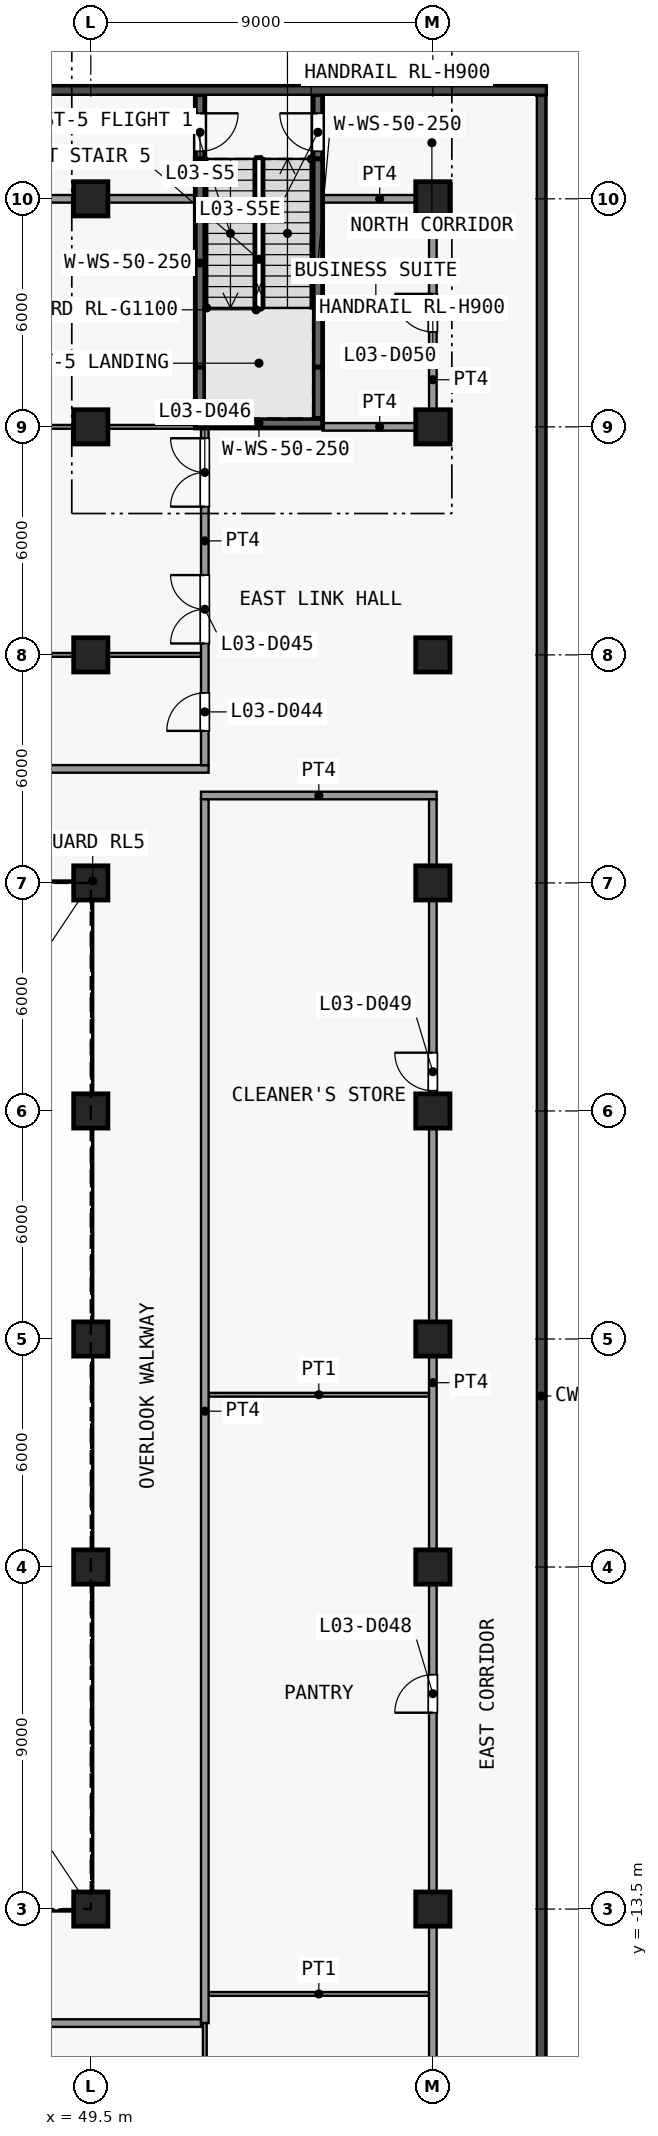
"""IFC4 building model, lengths in metres.
Left out: names, types, materials, properties, quantities, classifications, styles, units other than length and angle.
Written with IfcOpenShell. Run it as: python <this file> out.ifc"""

import sys

from ifc_helpers import new_model, si_unit, direction, frame, frame_2d, origin, origin_2d, place, context, subcontext, project, spatial, rectangle, extrude, element, fill, save


model = new_model("IFC4")
c1 = context("Model", 3, precision=1e-05, world=origin(), true_north=direction((0.0, 1.0)))
c2 = subcontext(c1, "Body", "Model", "MODEL_VIEW")
j1 = project(units=[si_unit("LENGTHUNIT", "METRE"), si_unit("PLANEANGLEUNIT", "RADIAN")], contexts=[c1])
p1 = place(None, origin())
s1 = spatial("IfcSite", under=j1, at=p1, CompositionType="ELEMENT")
p2 = place(p1, origin())
s2 = spatial("IfcBuilding", under=s1, at=p2, CompositionType="ELEMENT")
p3 = place(p2, frame((0.0, 0.0, 18.5)))
s3 = spatial("IfcBuildingStorey", under=s2, at=p3, CompositionType="ELEMENT", Elevation=18.5)
for number, where, z_axis, x_axis in (
    (1, (49.5, -13.5, 0.0), (0.0, 0.0, 1.0), (1.0, 0.0, 0.0)),
    (2, (49.5, -4.5, 0.0), (0.0, 0.0, 1.0), (1.0, 0.0, 0.0)),
    (3, (49.5, 1.5, 0.0), (0.0, 0.0, 1.0), (1.0, 0.0, 0.0)),
    (4, (49.5, 7.5, 0.0), (0.0, 0.0, 1.0), (1.0, 0.0, 0.0)),
    (5, (49.5, 13.5, 0.0), (0.0, 0.0, 1.0), (1.0, 0.0, 0.0)),
    (6, (49.5, 19.5, 0.0), (0.0, 0.0, 1.0), (1.0, 0.0, 0.0)),
    (7, (49.5, 25.5, 0.0), (0.0, 0.0, 1.0), (1.0, 0.0, 0.0)),
    (8, (49.5, 31.5, 0.0), (0.0, 0.0, 1.0), (1.0, 0.0, 0.0)),
    (9, (58.5, -13.5, 0.0), (0.0, 0.0, 1.0), (1.0, 0.0, 0.0)),
    (10, (58.5, -4.5, 0.0), (0.0, 0.0, 1.0), (1.0, 0.0, 0.0)),
    (11, (58.5, 1.5, 0.0), (0.0, 0.0, 1.0), (1.0, 0.0, 0.0)),
    (12, (58.5, 7.5, 0.0), (0.0, 0.0, 1.0), (1.0, 0.0, 0.0)),
    (13, (58.5, 13.5, 0.0), (0.0, 0.0, 1.0), (1.0, 0.0, 0.0)),
    (14, (58.5, 19.5, 0.0), (0.0, 0.0, 1.0), (1.0, 0.0, 0.0)),
    (15, (58.5, 25.5, 0.0), (0.0, 0.0, 1.0), (1.0, 0.0, 0.0)),
    (16, (58.5, 31.5, 0.0), (0.0, 0.0, 1.0), (1.0, 0.0, 0.0)),
):
    element("IfcColumn", number, at=place(p3, frame(where, z_axis=z_axis, x_axis=x_axis)), inside=s3, PredefinedType="COLUMN", context=c2, shape_type="SweptSolid", body=[
        extrude(rectangle(XDim=0.9, YDim=0.9, at=origin_2d()), origin(), (0.0, 0.0, 1.0), 5.0),
    ])
p4 = place(p3, frame((52.375, 34.24, 0.0), z_axis=(0.0, 0.0, 1.0), x_axis=(0.0, -1.0, 0.0)))
e17 = element("IfcWall", 17, at=p4, inside=s3, PredefinedType="SHEAR", context=c2, shape_type="SweptSolid", body=[
    extrude(rectangle(XDim=1.69, YDim=0.25, at=frame_2d((0.845, 0.0))), origin(), (0.0, 0.0, 1.0), 4.65),
])
p5 = place(p4, frame((0.49, 0.0, 0.0)))
e18 = element("IfcOpeningElement", 18, at=p5, cuts=e17, PredefinedType="OPENING", context=c2, shape_type="SweptSolid", body=[
    extrude(rectangle(XDim=1.0, YDim=2.1, at=frame_2d((0.5, 1.05))), frame((0.0, 0.135, 0.0), z_axis=(0.0, -1.0, 0.0), x_axis=(1.0, 0.0, 0.0)), (0.0, 0.0, 1.0), 0.27),
])
p6 = place(p3, frame((52.375, 27.07, 0.0), z_axis=(0.0, 0.0, 1.0), x_axis=(0.0, 1.0, 0.0)))
e19 = element("IfcWall", 19, at=p6, inside=s3, PredefinedType="SHEAR", context=c2, shape_type="SweptSolid", body=[
    extrude(rectangle(XDim=5.48, YDim=0.25, at=frame_2d((2.74, 0.0))), origin(), (0.0, 0.0, 1.0), 4.65),
])
p7 = place(p3, frame((52.375, 25.72, 0.0), z_axis=(0.0, 0.0, 1.0), x_axis=(0.0, 1.0, 0.0)))
e20 = element("IfcWall", 20, at=p7, inside=s3, PredefinedType="SHEAR", context=c2, shape_type="SweptSolid", body=[
    extrude(rectangle(XDim=1.35, YDim=0.25, at=frame_2d((0.675, 0.0))), origin(), (0.0, 0.0, 1.0), 4.65),
])
p8 = place(p3, frame((55.475, 32.55, 0.0), z_axis=(0.0, 0.0, 1.0), x_axis=(0.0, 1.0, 0.0)))
e21 = element("IfcWall", 21, at=p8, inside=s3, PredefinedType="SHEAR", context=c2, shape_type="SweptSolid", body=[
    extrude(rectangle(XDim=1.69, YDim=0.25, at=frame_2d((0.845, 0.0))), origin(), (0.0, 0.0, 1.0), 4.65),
])
p9 = place(p8, frame((0.2, 0.0, 0.0)))
e22 = element("IfcOpeningElement", 22, at=p9, cuts=e21, PredefinedType="OPENING", context=c2, shape_type="SweptSolid", body=[
    extrude(rectangle(XDim=1.0, YDim=2.1, at=frame_2d((0.5, 1.05))), frame((0.0, 0.135, 0.0), z_axis=(0.0, -1.0, 0.0), x_axis=(1.0, 0.0, 0.0)), (0.0, 0.0, 1.0), 0.27),
])
p10 = place(p3, frame((55.475, 27.07, 0.0), z_axis=(0.0, 0.0, 1.0), x_axis=(0.0, 1.0, 0.0)))
e23 = element("IfcWall", 23, at=p10, inside=s3, PredefinedType="SHEAR", context=c2, shape_type="SweptSolid", body=[
    extrude(rectangle(XDim=5.48, YDim=0.25, at=frame_2d((2.74, 0.0))), origin(), (0.0, 0.0, 1.0), 4.65),
])
p11 = place(p3, frame((55.475, 25.72, 0.0), z_axis=(0.0, 0.0, 1.0), x_axis=(0.0, 1.0, 0.0)))
e24 = element("IfcWall", 24, at=p11, inside=s3, PredefinedType="SHEAR", context=c2, shape_type="SweptSolid", body=[
    extrude(rectangle(XDim=1.35, YDim=0.25, at=frame_2d((0.675, 0.0))), origin(), (0.0, 0.0, 1.0), 4.65),
])
p12 = place(p3, frame((52.25, 25.595, 0.0), z_axis=(0.0, 0.0, 1.0), x_axis=(1.0, 0.0, 0.0)))
e25 = element("IfcWall", 25, at=p12, inside=s3, PredefinedType="SHEAR", context=c2, shape_type="SweptSolid", body=[
    extrude(rectangle(XDim=3.35, YDim=0.25, at=frame_2d((1.675, 0.0))), origin(), (0.0, 0.0, 1.0), 4.65),
])
p13 = place(p3, frame((31.4, -16.5, 0.0), z_axis=(0.0, 0.0, 1.0), x_axis=(1.0, 0.0, 0.0)))
e26 = element("IfcWall", 26, at=p13, inside=s3, PredefinedType="PARTITIONING", context=c2, shape_type="SweptSolid", body=[
    extrude(rectangle(XDim=21.0, YDim=0.2, at=frame_2d((10.5, 0.0))), origin(), (0.0, 0.0, 1.0), 4.65),
])
p14 = place(p13, frame((3.2, 0.0, 0.0)))
e27 = element("IfcOpeningElement", 27, at=p14, cuts=e26, PredefinedType="OPENING", context=c2, shape_type="SweptSolid", body=[
    extrude(rectangle(XDim=1.0, YDim=2.1, at=frame_2d((0.5, 1.05))), frame((0.0, 0.11, 0.0), z_axis=(0.0, -1.0, 0.0), x_axis=(1.0, 0.0, 0.0)), (0.0, 0.0, 1.0), 0.22),
])
p15 = place(p13, frame((14.0, 0.0, 0.0)))
e28 = element("IfcOpeningElement", 28, at=p15, cuts=e26, PredefinedType="OPENING", context=c2, shape_type="SweptSolid", body=[
    extrude(rectangle(XDim=1.0, YDim=2.1, at=frame_2d((0.5, 1.05))), frame((0.0, 0.11, 0.0), z_axis=(0.0, -1.0, 0.0), x_axis=(1.0, 0.0, 0.0)), (0.0, 0.0, 1.0), 0.22),
])
for number, where, z_axis, x_axis in (
    (29, (52.6, -15.733, 0.0), (0.0, 0.0, 1.0), (1.0, 0.0, 0.0)),
    (30, (52.6, 0.033, 0.0), (0.0, 0.0, 1.0), (1.0, 0.0, 0.0)),
):
    element("IfcWall", number, at=place(p3, frame(where, z_axis=z_axis, x_axis=x_axis)), inside=s3, PredefinedType="PARTITIONING", context=c2, shape_type="SweptSolid", body=[
        extrude(rectangle(XDim=5.8, YDim=0.1, at=frame_2d((2.9, 0.0))), origin(), (0.0, 0.0, 1.0), 4.65),
    ])
p16 = place(p3, frame((52.4, 15.8, 0.0), z_axis=(0.0, 0.0, 1.0), x_axis=(1.0, 0.0, 0.0)))
e31 = element("IfcWall", 31, at=p16, inside=s3, PredefinedType="PARTITIONING", context=c2, shape_type="SweptSolid", body=[
    extrude(rectangle(XDim=6.2, YDim=0.2, at=frame_2d((3.1, 0.0))), origin(), (0.0, 0.0, 1.0), 4.65),
])
p17 = place(p3, frame((28.4, 16.5, 0.0), z_axis=(0.0, 0.0, 1.0), x_axis=(1.0, 0.0, 0.0)))
e32 = element("IfcWall", 32, at=p17, inside=s3, PredefinedType="PARTITIONING", context=c2, shape_type="SweptSolid", body=[
    extrude(rectangle(XDim=24.2, YDim=0.2, at=frame_2d((12.1, 0.0))), origin(), (0.0, 0.0, 1.0), 4.65),
])
p18 = place(p17, frame((6.2, 0.0, 0.0)))
e33 = element("IfcOpeningElement", 33, at=p18, cuts=e32, PredefinedType="OPENING", context=c2, shape_type="SweptSolid", body=[
    extrude(rectangle(XDim=1.0, YDim=2.1, at=frame_2d((0.5, 1.05))), frame((0.0, 0.11, 0.0), z_axis=(0.0, -1.0, 0.0), x_axis=(1.0, 0.0, 0.0)), (0.0, 0.0, 1.0), 0.22),
])
p19 = place(p17, frame((17.0, 0.0, 0.0)))
e34 = element("IfcOpeningElement", 34, at=p19, cuts=e32, PredefinedType="OPENING", context=c2, shape_type="SweptSolid", body=[
    extrude(rectangle(XDim=1.0, YDim=2.1, at=frame_2d((0.5, 1.05))), frame((0.0, 0.11, 0.0), z_axis=(0.0, -1.0, 0.0), x_axis=(1.0, 0.0, 0.0)), (0.0, 0.0, 1.0), 0.22),
])
p20 = place(p3, frame((28.5, 19.5, 0.0), z_axis=(0.0, 0.0, 1.0), x_axis=(1.0, 0.0, 0.0)))
e35 = element("IfcWall", 35, at=p20, inside=s3, PredefinedType="PARTITIONING", context=c2, shape_type="SweptSolid", body=[
    extrude(rectangle(XDim=23.9, YDim=0.1, at=frame_2d((11.95, 0.0))), origin(), (0.0, 0.0, 1.0), 4.65),
])
p21 = place(p3, frame((55.6, 25.5, 0.0), z_axis=(0.0, 0.0, 1.0), x_axis=(1.0, 0.0, 0.0)))
e36 = element("IfcWall", 36, at=p21, inside=s3, PredefinedType="PARTITIONING", context=c2, shape_type="SweptSolid", body=[
    extrude(rectangle(XDim=3.0, YDim=0.2, at=frame_2d((1.5, 0.0))), origin(), (0.0, 0.0, 1.0), 4.65),
])
p22 = place(p3, frame((-25.9, 25.5, 0.0), z_axis=(0.0, 0.0, 1.0), x_axis=(1.0, 0.0, 0.0)))
e37 = element("IfcWall", 37, at=p22, inside=s3, PredefinedType="PARTITIONING", context=c2, shape_type="SweptSolid", body=[
    extrude(rectangle(XDim=78.15, YDim=0.1, at=frame_2d((39.075, 0.0))), origin(), (0.0, 0.0, 1.0), 4.65),
])
p23 = place(p3, frame((-25.9, 31.5, 0.0), z_axis=(0.0, 0.0, 1.0), x_axis=(1.0, 0.0, 0.0)))
e38 = element("IfcWall", 38, at=p23, inside=s3, PredefinedType="PARTITIONING", context=c2, shape_type="SweptSolid", body=[
    extrude(rectangle(XDim=78.15, YDim=0.2, at=frame_2d((39.075, 0.0))), origin(), (0.0, 0.0, 1.0), 4.65),
])
p24 = place(p23, frame((1.8, 0.0, 0.0)))
e39 = element("IfcOpeningElement", 39, at=p24, cuts=e38, PredefinedType="OPENING", context=c2, shape_type="SweptSolid", body=[
    extrude(rectangle(XDim=1.0, YDim=2.1, at=frame_2d((0.5, 1.05))), frame((0.0, 0.11, 0.0), z_axis=(0.0, -1.0, 0.0), x_axis=(1.0, 0.0, 0.0)), (0.0, 0.0, 1.0), 0.22),
])
p25 = place(p23, frame((7.8, 0.0, 0.0)))
e40 = element("IfcOpeningElement", 40, at=p25, cuts=e38, PredefinedType="OPENING", context=c2, shape_type="SweptSolid", body=[
    extrude(rectangle(XDim=1.0, YDim=2.1, at=frame_2d((0.5, 1.05))), frame((0.0, 0.11, 0.0), z_axis=(0.0, -1.0, 0.0), x_axis=(1.0, 0.0, 0.0)), (0.0, 0.0, 1.0), 0.22),
])
p26 = place(p23, frame((18.4, 0.0, 0.0)))
e41 = element("IfcOpeningElement", 41, at=p26, cuts=e38, PredefinedType="OPENING", context=c2, shape_type="SweptSolid", body=[
    extrude(rectangle(XDim=1.0, YDim=2.1, at=frame_2d((0.5, 1.05))), frame((0.0, 0.11, 0.0), z_axis=(0.0, -1.0, 0.0), x_axis=(1.0, 0.0, 0.0)), (0.0, 0.0, 1.0), 0.22),
])
p27 = place(p23, frame((34.8, 0.0, 0.0)))
e42 = element("IfcOpeningElement", 42, at=p27, cuts=e38, PredefinedType="OPENING", context=c2, shape_type="SweptSolid", body=[
    extrude(rectangle(XDim=1.0, YDim=2.1, at=frame_2d((0.5, 1.05))), frame((0.0, 0.11, 0.0), z_axis=(0.0, -1.0, 0.0), x_axis=(1.0, 0.0, 0.0)), (0.0, 0.0, 1.0), 0.22),
])
p28 = place(p23, frame((49.6, 0.0, 0.0)))
e43 = element("IfcOpeningElement", 43, at=p28, cuts=e38, PredefinedType="OPENING", context=c2, shape_type="SweptSolid", body=[
    extrude(rectangle(XDim=1.0, YDim=2.1, at=frame_2d((0.5, 1.05))), frame((0.0, 0.11, 0.0), z_axis=(0.0, -1.0, 0.0), x_axis=(1.0, 0.0, 0.0)), (0.0, 0.0, 1.0), 0.22),
])
p29 = place(p23, frame((59.9, 0.0, 0.0)))
e44 = element("IfcOpeningElement", 44, at=p29, cuts=e38, PredefinedType="OPENING", context=c2, shape_type="SweptSolid", body=[
    extrude(rectangle(XDim=1.0, YDim=2.1, at=frame_2d((0.5, 1.05))), frame((0.0, 0.11, 0.0), z_axis=(0.0, -1.0, 0.0), x_axis=(1.0, 0.0, 0.0)), (0.0, 0.0, 1.0), 0.22),
])
p30 = place(p23, frame((73.2, 0.0, 0.0)))
e45 = element("IfcOpeningElement", 45, at=p30, cuts=e38, PredefinedType="OPENING", context=c2, shape_type="SweptSolid", body=[
    extrude(rectangle(XDim=1.0, YDim=2.1, at=frame_2d((0.5, 1.05))), frame((0.0, 0.11, 0.0), z_axis=(0.0, -1.0, 0.0), x_axis=(1.0, 0.0, 0.0)), (0.0, 0.0, 1.0), 0.22),
])
p31 = place(p3, frame((55.6, 31.5, 0.0), z_axis=(0.0, 0.0, 1.0), x_axis=(1.0, 0.0, 0.0)))
e46 = element("IfcWall", 46, at=p31, inside=s3, PredefinedType="PARTITIONING", context=c2, shape_type="SweptSolid", body=[
    extrude(rectangle(XDim=3.0, YDim=0.2, at=frame_2d((1.5, 0.0))), origin(), (0.0, 0.0, 1.0), 4.65),
])
p32 = place(p3, frame((52.5, -16.5, 0.0), z_axis=(0.0, 0.0, 1.0), x_axis=(0.0, 1.0, 0.0)))
e47 = element("IfcWall", 47, at=p32, inside=s3, PredefinedType="PARTITIONING", context=c2, shape_type="SweptSolid", body=[
    extrude(rectangle(XDim=32.2, YDim=0.2, at=frame_2d((16.1, 0.0))), origin(), (0.0, 0.0, 1.0), 4.65),
])
p33 = place(p3, frame((52.5, 16.6, 0.0), z_axis=(0.0, 0.0, 1.0), x_axis=(0.0, 1.0, 0.0)))
e48 = element("IfcWall", 48, at=p33, inside=s3, PredefinedType="PARTITIONING", context=c2, shape_type="SweptSolid", body=[
    extrude(rectangle(XDim=8.87, YDim=0.2, at=frame_2d((4.435, 0.0))), origin(), (0.0, 0.0, 1.0), 4.65),
])
p34 = place(p33, frame((0.9, 0.0, 0.0)))
e49 = element("IfcOpeningElement", 49, at=p34, cuts=e48, PredefinedType="OPENING", context=c2, shape_type="SweptSolid", body=[
    extrude(rectangle(XDim=1.0, YDim=2.1, at=frame_2d((0.5, 1.05))), frame((0.0, 0.11, 0.0), z_axis=(0.0, -1.0, 0.0), x_axis=(1.0, 0.0, 0.0)), (0.0, 0.0, 1.0), 0.22),
])
p35 = place(p33, frame((3.2, 0.0, 0.0)))
e50 = element("IfcOpeningElement", 50, at=p35, cuts=e48, PredefinedType="OPENING", context=c2, shape_type="SweptSolid", body=[
    extrude(rectangle(XDim=1.8, YDim=2.1, at=frame_2d((0.9, 1.05))), frame((0.0, 0.11, 0.0), z_axis=(0.0, -1.0, 0.0), x_axis=(1.0, 0.0, 0.0)), (0.0, 0.0, 1.0), 0.22),
])
p36 = place(p33, frame((6.8, 0.0, 0.0)))
e51 = element("IfcOpeningElement", 51, at=p36, cuts=e48, PredefinedType="OPENING", context=c2, shape_type="SweptSolid", body=[
    extrude(rectangle(XDim=1.8, YDim=2.1, at=frame_2d((0.9, 1.05))), frame((0.0, 0.11, 0.0), z_axis=(0.0, -1.0, 0.0), x_axis=(1.0, 0.0, 0.0)), (0.0, 0.0, 1.0), 0.22),
])
p37 = place(p3, frame((52.5, -25.47, 0.0), z_axis=(0.0, 0.0, 1.0), x_axis=(0.0, 1.0, 0.0)))
e52 = element("IfcWall", 52, at=p37, inside=s3, PredefinedType="PARTITIONING", context=c2, shape_type="SweptSolid", body=[
    extrude(rectangle(XDim=8.97, YDim=0.1, at=frame_2d((4.485, 0.0))), origin(), (0.0, 0.0, 1.0), 4.65),
])
p38 = place(p3, frame((58.5, -31.4, 0.0), z_axis=(0.0, 0.0, 1.0), x_axis=(0.0, 1.0, 0.0)))
e53 = element("IfcWall", 53, at=p38, inside=s3, PredefinedType="PARTITIONING", context=c2, shape_type="SweptSolid", body=[
    extrude(rectangle(XDim=47.1, YDim=0.2, at=frame_2d((23.55, 0.0))), origin(), (0.0, 0.0, 1.0), 4.65),
])
p39 = place(p38, frame((7.3, 0.0, 0.0)))
e54 = element("IfcOpeningElement", 54, at=p39, cuts=e53, PredefinedType="OPENING", context=c2, shape_type="SweptSolid", body=[
    extrude(rectangle(XDim=1.0, YDim=2.1, at=frame_2d((0.5, 1.05))), frame((0.0, 0.11, 0.0), z_axis=(0.0, -1.0, 0.0), x_axis=(1.0, 0.0, 0.0)), (0.0, 0.0, 1.0), 0.22),
])
p40 = place(p38, frame((23.067, 0.0, 0.0)))
e55 = element("IfcOpeningElement", 55, at=p40, cuts=e53, PredefinedType="OPENING", context=c2, shape_type="SweptSolid", body=[
    extrude(rectangle(XDim=1.0, YDim=2.1, at=frame_2d((0.5, 1.05))), frame((0.0, 0.11, 0.0), z_axis=(0.0, -1.0, 0.0), x_axis=(1.0, 0.0, 0.0)), (0.0, 0.0, 1.0), 0.22),
])
p41 = place(p38, frame((39.433, 0.0, 0.0)))
e56 = element("IfcOpeningElement", 56, at=p41, cuts=e53, PredefinedType="OPENING", context=c2, shape_type="SweptSolid", body=[
    extrude(rectangle(XDim=1.0, YDim=2.1, at=frame_2d((0.5, 1.05))), frame((0.0, 0.11, 0.0), z_axis=(0.0, -1.0, 0.0), x_axis=(1.0, 0.0, 0.0)), (0.0, 0.0, 1.0), 0.22),
])
p42 = place(p3, frame((58.5, 25.6, 0.0), z_axis=(0.0, 0.0, 1.0), x_axis=(0.0, 1.0, 0.0)))
e57 = element("IfcWall", 57, at=p42, inside=s3, PredefinedType="PARTITIONING", context=c2, shape_type="SweptSolid", body=[
    extrude(rectangle(XDim=5.8, YDim=0.2, at=frame_2d((2.9, 0.0))), origin(), (0.0, 0.0, 1.0), 4.65),
])
p43 = place(p42, frame((2.4, 0.0, 0.0)))
e58 = element("IfcOpeningElement", 58, at=p43, cuts=e57, PredefinedType="OPENING", context=c2, shape_type="SweptSolid", body=[
    extrude(rectangle(XDim=1.0, YDim=2.1, at=frame_2d((0.5, 1.05))), frame((0.0, 0.11, 0.0), z_axis=(0.0, -1.0, 0.0), x_axis=(1.0, 0.0, 0.0)), (0.0, 0.0, 1.0), 0.22),
])
p44 = place(p5, origin())
e59 = element("IfcDoor", 59, at=p44, inside=s3, OperationType="SINGLE_SWING_LEFT", PredefinedType="DOOR", context=c2, shape_type="SweptSolid", body=[
    extrude(rectangle(XDim=1.0, YDim=2.1, at=frame_2d((0.5, 1.05))), frame((0.0, 0.025, 0.0), z_axis=(0.0, -1.0, 0.0), x_axis=(1.0, 0.0, 0.0)), (0.0, 0.0, 1.0), 0.05),
])
fill(e18, e59)
p45 = place(p9, origin())
e60 = element("IfcDoor", 60, at=p45, inside=s3, OperationType="SINGLE_SWING_RIGHT", PredefinedType="DOOR", context=c2, shape_type="SweptSolid", body=[
    extrude(rectangle(XDim=1.0, YDim=2.1, at=frame_2d((0.5, 1.05))), frame((0.0, 0.025, 0.0), z_axis=(0.0, -1.0, 0.0), x_axis=(1.0, 0.0, 0.0)), (0.0, 0.0, 1.0), 0.05),
])
fill(e22, e60)
p46 = place(p34, origin())
e61 = element("IfcDoor", 61, at=p46, inside=s3, OperationType="SINGLE_SWING_RIGHT", PredefinedType="DOOR", context=c2, shape_type="SweptSolid", body=[
    extrude(rectangle(XDim=1.0, YDim=2.1, at=frame_2d((0.5, 1.05))), frame((0.0, 0.025, 0.0), z_axis=(0.0, -1.0, 0.0), x_axis=(1.0, 0.0, 0.0)), (0.0, 0.0, 1.0), 0.05),
])
fill(e49, e61)
p47 = place(p35, origin())
e62 = element("IfcDoor", 62, at=p47, inside=s3, OperationType="DOUBLE_DOOR_SINGLE_SWING", PredefinedType="DOOR", context=c2, shape_type="SweptSolid", body=[
    extrude(rectangle(XDim=1.8, YDim=2.1, at=frame_2d((0.9, 1.05))), frame((0.0, 0.025, 0.0), z_axis=(0.0, -1.0, 0.0), x_axis=(1.0, 0.0, 0.0)), (0.0, 0.0, 1.0), 0.05),
])
fill(e50, e62)
p48 = place(p36, origin())
e63 = element("IfcDoor", 63, at=p48, inside=s3, OperationType="DOUBLE_DOOR_SINGLE_SWING", PredefinedType="DOOR", context=c2, shape_type="SweptSolid", body=[
    extrude(rectangle(XDim=1.8, YDim=2.1, at=frame_2d((0.9, 1.05))), frame((0.0, 0.025, 0.0), z_axis=(0.0, -1.0, 0.0), x_axis=(1.0, 0.0, 0.0)), (0.0, 0.0, 1.0), 0.05),
])
fill(e51, e63)
p49 = place(p40, origin())
e64 = element("IfcDoor", 64, at=p49, inside=s3, OperationType="SINGLE_SWING_RIGHT", PredefinedType="DOOR", context=c2, shape_type="SweptSolid", body=[
    extrude(rectangle(XDim=1.0, YDim=2.1, at=frame_2d((0.5, 1.05))), frame((0.0, 0.025, 0.0), z_axis=(0.0, -1.0, 0.0), x_axis=(1.0, 0.0, 0.0)), (0.0, 0.0, 1.0), 0.05),
])
fill(e55, e64)
p50 = place(p41, origin())
e65 = element("IfcDoor", 65, at=p50, inside=s3, OperationType="SINGLE_SWING_LEFT", PredefinedType="DOOR", context=c2, shape_type="SweptSolid", body=[
    extrude(rectangle(XDim=1.0, YDim=2.1, at=frame_2d((0.5, 1.05))), frame((0.0, 0.025, 0.0), z_axis=(0.0, -1.0, 0.0), x_axis=(1.0, 0.0, 0.0)), (0.0, 0.0, 1.0), 0.05),
])
fill(e56, e65)
p51 = place(p43, origin())
e66 = element("IfcDoor", 66, at=p51, inside=s3, OperationType="SINGLE_SWING_LEFT", PredefinedType="DOOR", context=c2, shape_type="SweptSolid", body=[
    extrude(rectangle(XDim=1.0, YDim=2.1, at=frame_2d((0.5, 1.05))), frame((0.0, 0.025, 0.0), z_axis=(0.0, -1.0, 0.0), x_axis=(1.0, 0.0, 0.0)), (0.0, 0.0, 1.0), 0.05),
])
fill(e58, e66)
save(model, sys.argv[1])
